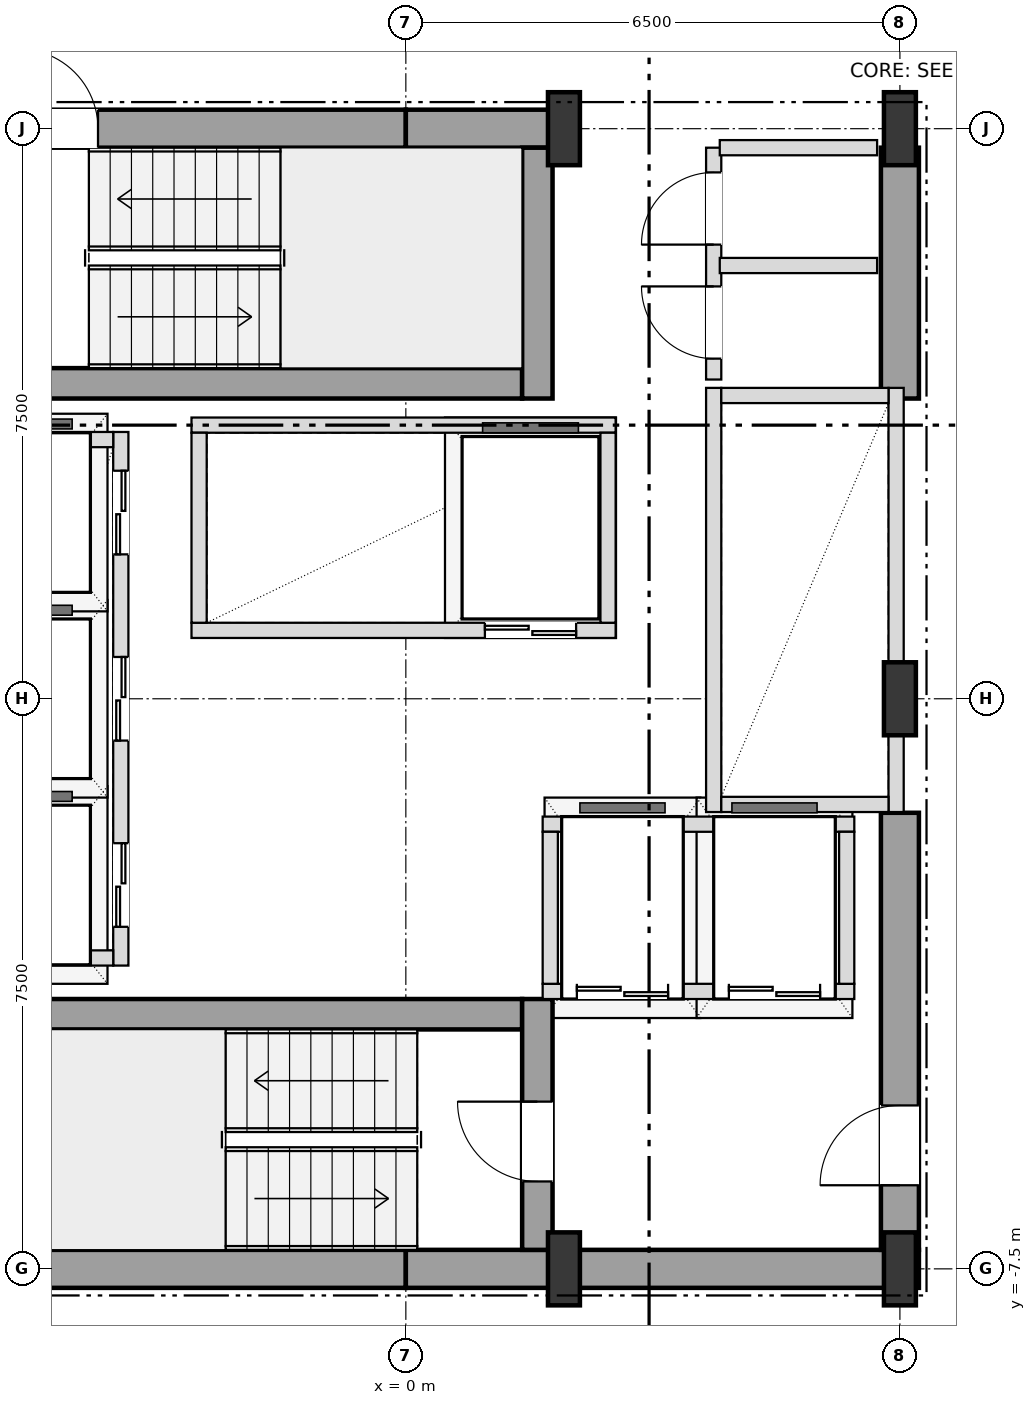
"""IFC4 building model, lengths in metres.
Left out: names, types, materials, properties, quantities, classifications, styles, units other than length and angle.
Written with IfcOpenShell. Run it as: python <this file> out.ifc"""

import sys

from ifc_helpers import new_model, si_unit, direction, frame, frame_2d, origin, origin_2d, place, context, subcontext, project, spatial, rectangle, i_section, extrude, element, fill, save


model = new_model("IFC4")
c1 = context("Model", 3, precision=1e-05, world=origin(), true_north=direction((0.0, 1.0)))
c2 = subcontext(c1, "Body", "Model", "MODEL_VIEW")
j1 = project(units=[si_unit("LENGTHUNIT", "METRE"), si_unit("PLANEANGLEUNIT", "RADIAN")], contexts=[c1])
p1 = place(None, origin())
s1 = spatial("IfcSite", under=j1, at=p1, CompositionType="ELEMENT")
p2 = place(p1, origin())
s2 = spatial("IfcBuilding", under=s1, at=p2, CompositionType="ELEMENT")
p3 = place(p2, frame((0.0, 0.0, 39.6)))
s3 = spatial("IfcBuildingStorey", under=s2, at=p3, CompositionType="ELEMENT", Elevation=39.6)
for number, where, z_axis, x_axis in (
    (1, (2.08, -7.5, 0.0), (0.0, 0.0, 1.0), (1.0, 0.0, 0.0)),
    (2, (6.5, -7.5, 0.0), (0.0, 0.0, 1.0), (1.0, 0.0, 0.0)),
    (3, (6.5, 0.0, 0.0), (0.0, 0.0, 1.0), (1.0, 0.0, 0.0)),
    (4, (2.08, 7.5, 0.0), (0.0, 0.0, 1.0), (1.0, 0.0, 0.0)),
    (5, (6.5, 7.5, 0.0), (0.0, 0.0, 1.0), (1.0, 0.0, 0.0)),
):
    element("IfcColumn", number, at=place(p3, frame(where, z_axis=z_axis, x_axis=x_axis)), inside=s3, PredefinedType="COLUMN", context=c2, shape_type="SweptSolid", body=[
        extrude(i_section(OverallWidth=0.42, OverallDepth=0.96, WebThickness=0.022, FlangeThickness=0.034, at=origin_2d()), origin(), (0.0, 0.0, 1.0), 3.6),
    ])
for number, where, z_axis, x_axis in (
    (6, (-6.75, -7.5, 0.0), (0.0, 0.0, 1.0), (1.0, 0.0, 0.0)),
    (7, (0.0, -7.5, 0.0), (0.0, 0.0, 1.0), (1.0, 0.0, 0.0)),
):
    element("IfcWall", number, at=place(p3, frame(where, z_axis=z_axis, x_axis=x_axis)), inside=s3, PredefinedType="SHEAR", context=c2, shape_type="SweptSolid", body=[
        extrude(rectangle(XDim=6.75, YDim=0.5, at=frame_2d((3.375, 0.0))), origin(), (0.0, 0.0, 1.0), 3.38),
    ])
p4 = place(p3, frame((-6.75, 7.5, 0.0), z_axis=(0.0, 0.0, 1.0), x_axis=(1.0, 0.0, 0.0)))
e8 = element("IfcWall", 8, at=p4, inside=s3, PredefinedType="SHEAR", context=c2, shape_type="SweptSolid", body=[
    extrude(rectangle(XDim=6.75, YDim=0.5, at=frame_2d((3.375, 0.0))), origin(), (0.0, 0.0, 1.0), 3.38),
])
p5 = place(p4, frame((1.65, 0.0, 0.0)))
e9 = element("IfcOpeningElement", 9, at=p5, cuts=e8, PredefinedType="OPENING", context=c2, shape_type="SweptSolid", body=[
    extrude(rectangle(XDim=1.05, YDim=2.15, at=frame_2d((0.525, 1.075))), frame((0.0, 0.26, 0.0), z_axis=(0.0, -1.0, 0.0), x_axis=(1.0, 0.0, 0.0)), (0.0, 0.0, 1.0), 0.52),
])
p6 = place(p3, frame((0.0, 7.5, 0.0), z_axis=(0.0, 0.0, 1.0), x_axis=(1.0, 0.0, 0.0)))
e10 = element("IfcWall", 10, at=p6, inside=s3, PredefinedType="SHEAR", context=c2, shape_type="SweptSolid", body=[
    extrude(rectangle(XDim=2.08, YDim=0.5, at=frame_2d((1.04, 0.0))), origin(), (0.0, 0.0, 1.0), 3.38),
])
p7 = place(p3, frame((6.5, -7.25, 0.0), z_axis=(0.0, 0.0, 1.0), x_axis=(0.0, 1.0, 0.0)))
e11 = element("IfcWall", 11, at=p7, inside=s3, PredefinedType="SHEAR", context=c2, shape_type="SweptSolid", body=[
    extrude(rectangle(XDim=5.75, YDim=0.5, at=frame_2d((2.875, 0.0))), origin(), (0.0, 0.0, 1.0), 3.38),
])
p8 = place(p7, frame((0.85, 0.0, 0.0)))
e12 = element("IfcOpeningElement", 12, at=p8, cuts=e11, PredefinedType="OPENING", context=c2, shape_type="SweptSolid", body=[
    extrude(rectangle(XDim=1.05, YDim=2.15, at=frame_2d((0.525, 1.075))), frame((0.0, 0.26, 0.0), z_axis=(0.0, -1.0, 0.0), x_axis=(1.0, 0.0, 0.0)), (0.0, 0.0, 1.0), 0.52),
])
p9 = place(p3, frame((6.5, 3.95, 0.0), z_axis=(0.0, 0.0, 1.0), x_axis=(0.0, 1.0, 0.0)))
e13 = element("IfcWall", 13, at=p9, inside=s3, PredefinedType="SHEAR", context=c2, shape_type="SweptSolid", body=[
    extrude(rectangle(XDim=3.3, YDim=0.5, at=frame_2d((1.65, 0.0))), origin(), (0.0, 0.0, 1.0), 3.38),
])
p10 = place(p3, frame((-6.25, -4.15, 0.0), z_axis=(0.0, 0.0, 1.0), x_axis=(1.0, 0.0, 0.0)))
e14 = element("IfcWall", 14, at=p10, inside=s3, PredefinedType="SHEAR", context=c2, shape_type="SweptSolid", body=[
    extrude(rectangle(XDim=7.78, YDim=0.4, at=frame_2d((3.89, 0.0))), origin(), (0.0, 0.0, 1.0), 3.38),
])
p11 = place(p3, frame((1.73, -7.25, 0.0), z_axis=(0.0, 0.0, 1.0), x_axis=(0.0, 1.0, 0.0)))
e15 = element("IfcWall", 15, at=p11, inside=s3, PredefinedType="SHEAR", context=c2, shape_type="SweptSolid", body=[
    extrude(rectangle(XDim=3.3, YDim=0.4, at=frame_2d((1.65, 0.0))), origin(), (0.0, 0.0, 1.0), 3.38),
])
p12 = place(p11, frame((0.9, 0.0, 0.0)))
e16 = element("IfcOpeningElement", 16, at=p12, cuts=e15, PredefinedType="OPENING", context=c2, shape_type="SweptSolid", body=[
    extrude(rectangle(XDim=1.05, YDim=2.15, at=frame_2d((0.525, 1.075))), frame((0.0, 0.21, 0.0), z_axis=(0.0, -1.0, 0.0), x_axis=(1.0, 0.0, 0.0)), (0.0, 0.0, 1.0), 0.42),
])
p13 = place(p3, frame((-5.55, 4.15, 0.0), z_axis=(0.0, 0.0, 1.0), x_axis=(1.0, 0.0, 0.0)))
e17 = element("IfcWall", 17, at=p13, inside=s3, PredefinedType="SHEAR", context=c2, shape_type="SweptSolid", body=[
    extrude(rectangle(XDim=7.08, YDim=0.4, at=frame_2d((3.54, 0.0))), origin(), (0.0, 0.0, 1.0), 3.38),
])
p14 = place(p3, frame((1.73, 3.95, 0.0), z_axis=(0.0, 0.0, 1.0), x_axis=(0.0, 1.0, 0.0)))
e18 = element("IfcWall", 18, at=p14, inside=s3, PredefinedType="SHEAR", context=c2, shape_type="SweptSolid", body=[
    extrude(rectangle(XDim=3.3, YDim=0.4, at=frame_2d((1.65, 0.0))), origin(), (0.0, 0.0, 1.0), 3.38),
])
p15 = place(p3, frame((-3.75, -3.51, 0.0), z_axis=(0.0, 0.0, 1.0), x_axis=(0.0, 1.0, 0.0)))
e19 = element("IfcWall", 19, at=p15, inside=s3, PredefinedType="SOLIDWALL", context=c2, shape_type="SweptSolid", body=[
    extrude(rectangle(XDim=7.02, YDim=0.2, at=frame_2d((3.51, 0.0))), origin(), (0.0, 0.0, 1.0), 3.38),
])
p16 = place(p15, frame((0.51, 0.0, 0.0)))
e20 = element("IfcOpeningElement", 20, at=p16, cuts=e19, PredefinedType="OPENING", context=c2, shape_type="SweptSolid", body=[
    extrude(rectangle(XDim=1.1, YDim=2.15, at=frame_2d((0.55, 1.075))), frame((0.0, 0.11, 0.0), z_axis=(0.0, -1.0, 0.0), x_axis=(1.0, 0.0, 0.0)), (0.0, 0.0, 1.0), 0.22),
])
p17 = place(p15, frame((2.96, 0.0, 0.0)))
e21 = element("IfcOpeningElement", 21, at=p17, cuts=e19, PredefinedType="OPENING", context=c2, shape_type="SweptSolid", body=[
    extrude(rectangle(XDim=1.1, YDim=2.15, at=frame_2d((0.55, 1.075))), frame((0.0, 0.11, 0.0), z_axis=(0.0, -1.0, 0.0), x_axis=(1.0, 0.0, 0.0)), (0.0, 0.0, 1.0), 0.22),
])
p18 = place(p15, frame((5.41, 0.0, 0.0)))
e22 = element("IfcOpeningElement", 22, at=p18, cuts=e19, PredefinedType="OPENING", context=c2, shape_type="SweptSolid", body=[
    extrude(rectangle(XDim=1.1, YDim=2.15, at=frame_2d((0.55, 1.075))), frame((0.0, 0.11, 0.0), z_axis=(0.0, -1.0, 0.0), x_axis=(1.0, 0.0, 0.0)), (0.0, 0.0, 1.0), 0.22),
])
for number, where, z_axis, x_axis in (
    (23, (-6.05, -3.41, 0.0), (0.0, 0.0, 1.0), (1.0, 0.0, 0.0)),
    (24, (-6.05, 3.41, 0.0), (0.0, 0.0, 1.0), (1.0, 0.0, 0.0)),
):
    element("IfcWall", number, at=place(p3, frame(where, z_axis=z_axis, x_axis=x_axis)), inside=s3, PredefinedType="SOLIDWALL", context=c2, shape_type="SweptSolid", body=[
        extrude(rectangle(XDim=2.2, YDim=0.2, at=frame_2d((1.1, 0.0))), origin(), (0.0, 0.0, 1.0), 3.38),
    ])
p19 = place(p3, frame((4.05, -1.49, 0.0), z_axis=(0.0, 0.0, 1.0), x_axis=(0.0, 1.0, 0.0)))
e25 = element("IfcWall", 25, at=p19, inside=s3, PredefinedType="SOLIDWALL", context=c2, shape_type="SweptSolid", body=[
    extrude(rectangle(XDim=5.58, YDim=0.2, at=frame_2d((2.79, 0.0))), origin(), (0.0, 0.0, 1.0), 3.38),
])
p20 = place(p3, frame((6.45, -1.49, 0.0), z_axis=(0.0, 0.0, 1.0), x_axis=(0.0, 1.0, 0.0)))
e26 = element("IfcWall", 26, at=p20, inside=s3, PredefinedType="SOLIDWALL", context=c2, shape_type="SweptSolid", body=[
    extrude(rectangle(XDim=5.58, YDim=0.2, at=frame_2d((2.79, 0.0))), origin(), (0.0, 0.0, 1.0), 2.816),
])
for number, where, z_axis, x_axis in (
    (27, (4.15, -1.39, 0.0), (0.0, 0.0, 1.0), (1.0, 0.0, 0.0)),
    (28, (4.15, 3.99, 0.0), (0.0, 0.0, 1.0), (1.0, 0.0, 0.0)),
):
    element("IfcWall", number, at=place(p3, frame(where, z_axis=z_axis, x_axis=x_axis)), inside=s3, PredefinedType="SOLIDWALL", context=c2, shape_type="SweptSolid", body=[
        extrude(rectangle(XDim=2.2, YDim=0.2, at=frame_2d((1.1, 0.0))), origin(), (0.0, 0.0, 1.0), 3.38),
    ])
p21 = place(p3, frame((-2.82, 0.9, 0.0), z_axis=(0.0, 0.0, 1.0), x_axis=(1.0, 0.0, 0.0)))
e29 = element("IfcWall", 29, at=p21, inside=s3, PredefinedType="SOLIDWALL", context=c2, shape_type="SweptSolid", body=[
    extrude(rectangle(XDim=5.58, YDim=0.2, at=frame_2d((2.79, 0.0))), origin(), (0.0, 0.0, 1.0), 3.38),
])
p22 = place(p21, frame((3.86, 0.0, 0.0)))
e30 = element("IfcOpeningElement", 30, at=p22, cuts=e29, PredefinedType="OPENING", context=c2, shape_type="SweptSolid", body=[
    extrude(rectangle(XDim=1.2, YDim=2.2, at=frame_2d((0.6, 1.1))), frame((0.0, 0.11, 0.0), z_axis=(0.0, -1.0, 0.0), x_axis=(1.0, 0.0, 0.0)), (0.0, 0.0, 1.0), 0.22),
])
p23 = place(p3, frame((-2.82, 3.6, 0.0), z_axis=(0.0, 0.0, 1.0), x_axis=(1.0, 0.0, 0.0)))
e31 = element("IfcWall", 31, at=p23, inside=s3, PredefinedType="SOLIDWALL", context=c2, shape_type="SweptSolid", body=[
    extrude(rectangle(XDim=5.58, YDim=0.2, at=frame_2d((2.79, 0.0))), origin(), (0.0, 0.0, 1.0), 3.38),
])
for number, where, z_axis, x_axis in (
    (32, (-2.72, 1.0, 0.0), (0.0, 0.0, 1.0), (0.0, 1.0, 0.0)),
    (33, (2.66, 1.0, 0.0), (0.0, 0.0, 1.0), (0.0, 1.0, 0.0)),
):
    element("IfcWall", number, at=place(p3, frame(where, z_axis=z_axis, x_axis=x_axis)), inside=s3, PredefinedType="SOLIDWALL", context=c2, shape_type="SweptSolid", body=[
        extrude(rectangle(XDim=2.5, YDim=0.2, at=frame_2d((1.25, 0.0))), origin(), (0.0, 0.0, 1.0), 3.38),
    ])
p24 = place(p3, frame((1.8, -3.85, 0.0), z_axis=(0.0, 0.0, 1.0), x_axis=(1.0, 0.0, 0.0)))
e34 = element("IfcWall", 34, at=p24, inside=s3, PredefinedType="SOLIDWALL", context=c2, shape_type="SweptSolid", body=[
    extrude(rectangle(XDim=4.1, YDim=0.2, at=frame_2d((2.05, 0.0))), origin(), (0.0, 0.0, 1.0), 3.38),
])
p25 = place(p24, frame((0.45, 0.0, 0.0)))
e35 = element("IfcOpeningElement", 35, at=p25, cuts=e34, PredefinedType="OPENING", context=c2, shape_type="SweptSolid", body=[
    extrude(rectangle(XDim=1.2, YDim=2.2, at=frame_2d((0.6, 1.1))), frame((0.0, 0.11, 0.0), z_axis=(0.0, -1.0, 0.0), x_axis=(1.0, 0.0, 0.0)), (0.0, 0.0, 1.0), 0.22),
])
p26 = place(p24, frame((2.45, 0.0, 0.0)))
e36 = element("IfcOpeningElement", 36, at=p26, cuts=e34, PredefinedType="OPENING", context=c2, shape_type="SweptSolid", body=[
    extrude(rectangle(XDim=1.2, YDim=2.2, at=frame_2d((0.6, 1.1))), frame((0.0, 0.11, 0.0), z_axis=(0.0, -1.0, 0.0), x_axis=(1.0, 0.0, 0.0)), (0.0, 0.0, 1.0), 0.22),
])
p27 = place(p3, frame((1.8, -1.65, 0.0), z_axis=(0.0, 0.0, 1.0), x_axis=(1.0, 0.0, 0.0)))
e37 = element("IfcWall", 37, at=p27, inside=s3, PredefinedType="SOLIDWALL", context=c2, shape_type="SweptSolid", body=[
    extrude(rectangle(XDim=4.1, YDim=0.2, at=frame_2d((2.05, 0.0))), origin(), (0.0, 0.0, 1.0), 3.38),
])
for number, where, z_axis, x_axis in (
    (38, (1.9, -3.75, 0.0), (0.0, 0.0, 1.0), (0.0, 1.0, 0.0)),
    (39, (5.8, -3.75, 0.0), (0.0, 0.0, 1.0), (0.0, 1.0, 0.0)),
):
    element("IfcWall", number, at=place(p3, frame(where, z_axis=z_axis, x_axis=x_axis)), inside=s3, PredefinedType="SOLIDWALL", context=c2, shape_type="SweptSolid", body=[
        extrude(rectangle(XDim=2.0, YDim=0.2, at=frame_2d((1.0, 0.0))), origin(), (0.0, 0.0, 1.0), 3.38),
    ])
p28 = place(p3, frame((4.05, 4.2, 0.0), z_axis=(0.0, 0.0, 1.0), x_axis=(0.0, 1.0, 0.0)))
e40 = element("IfcWall", 40, at=p28, inside=s3, PredefinedType="SOLIDWALL", context=c2, shape_type="SweptSolid", body=[
    extrude(rectangle(XDim=3.05, YDim=0.2, at=frame_2d((1.525, 0.0))), origin(), (0.0, 0.0, 1.0), 3.38),
])
p29 = place(p28, frame((0.275, 0.0, 0.0)))
e41 = element("IfcOpeningElement", 41, at=p29, cuts=e40, PredefinedType="OPENING", context=c2, shape_type="SweptSolid", body=[
    extrude(rectangle(XDim=0.95, YDim=2.15, at=frame_2d((0.475, 1.075))), frame((0.0, 0.11, 0.0), z_axis=(0.0, -1.0, 0.0), x_axis=(1.0, 0.0, 0.0)), (0.0, 0.0, 1.0), 0.22),
])
p30 = place(p28, frame((1.775, 0.0, 0.0)))
e42 = element("IfcOpeningElement", 42, at=p30, cuts=e40, PredefinedType="OPENING", context=c2, shape_type="SweptSolid", body=[
    extrude(rectangle(XDim=0.95, YDim=2.15, at=frame_2d((0.475, 1.075))), frame((0.0, 0.11, 0.0), z_axis=(0.0, -1.0, 0.0), x_axis=(1.0, 0.0, 0.0)), (0.0, 0.0, 1.0), 0.22),
])
for number, where, z_axis, x_axis in (
    (43, (4.13, 5.7, 0.0), (0.0, 0.0, 1.0), (1.0, 0.0, 0.0)),
    (44, (4.13, 7.25, 0.0), (0.0, 0.0, 1.0), (1.0, 0.0, 0.0)),
):
    element("IfcWall", number, at=place(p3, frame(where, z_axis=z_axis, x_axis=x_axis)), inside=s3, PredefinedType="SOLIDWALL", context=c2, shape_type="SweptSolid", body=[
        extrude(rectangle(XDim=2.07, YDim=0.2, at=frame_2d((1.035, 0.0))), origin(), (0.0, 0.0, 1.0), 3.38),
    ])
p31 = place(p8, origin())
e45 = element("IfcDoor", 45, at=p31, inside=s3, OperationType="SINGLE_SWING_LEFT", PredefinedType="DOOR", context=c2, shape_type="SweptSolid", body=[
    extrude(rectangle(XDim=1.05, YDim=2.15, at=frame_2d((0.525, 1.075))), frame((0.0, 0.025, 0.0), z_axis=(0.0, -1.0, 0.0), x_axis=(1.0, 0.0, 0.0)), (0.0, 0.0, 1.0), 0.05),
])
fill(e12, e45)
p32 = place(p12, origin())
e46 = element("IfcDoor", 46, at=p32, inside=s3, OperationType="SINGLE_SWING_RIGHT", PredefinedType="DOOR", context=c2, shape_type="SweptSolid", body=[
    extrude(rectangle(XDim=1.05, YDim=2.15, at=frame_2d((0.525, 1.075))), frame((0.0, 0.025, 0.0), z_axis=(0.0, -1.0, 0.0), x_axis=(1.0, 0.0, 0.0)), (0.0, 0.0, 1.0), 0.05),
])
fill(e16, e46)
p33 = place(p5, origin())
e47 = element("IfcDoor", 47, at=p33, inside=s3, OperationType="SINGLE_SWING_LEFT", PredefinedType="DOOR", context=c2, shape_type="SweptSolid", body=[
    extrude(rectangle(XDim=1.05, YDim=2.15, at=frame_2d((0.525, 1.075))), frame((0.0, 0.025, 0.0), z_axis=(0.0, -1.0, 0.0), x_axis=(1.0, 0.0, 0.0)), (0.0, 0.0, 1.0), 0.05),
])
fill(e9, e47)
p34 = place(p16, origin())
e48 = element("IfcDoor", 48, at=p34, inside=s3, OperationType="DOUBLE_DOOR_SLIDING", PredefinedType="DOOR", context=c2, shape_type="SweptSolid", body=[
    extrude(rectangle(XDim=1.1, YDim=2.15, at=frame_2d((0.55, 1.075))), frame((0.0, 0.025, 0.0), z_axis=(0.0, -1.0, 0.0), x_axis=(1.0, 0.0, 0.0)), (0.0, 0.0, 1.0), 0.05),
])
fill(e20, e48)
p35 = place(p17, origin())
e49 = element("IfcDoor", 49, at=p35, inside=s3, OperationType="DOUBLE_DOOR_SLIDING", PredefinedType="DOOR", context=c2, shape_type="SweptSolid", body=[
    extrude(rectangle(XDim=1.1, YDim=2.15, at=frame_2d((0.55, 1.075))), frame((0.0, 0.025, 0.0), z_axis=(0.0, -1.0, 0.0), x_axis=(1.0, 0.0, 0.0)), (0.0, 0.0, 1.0), 0.05),
])
fill(e21, e49)
p36 = place(p18, origin())
e50 = element("IfcDoor", 50, at=p36, inside=s3, OperationType="DOUBLE_DOOR_SLIDING", PredefinedType="DOOR", context=c2, shape_type="SweptSolid", body=[
    extrude(rectangle(XDim=1.1, YDim=2.15, at=frame_2d((0.55, 1.075))), frame((0.0, 0.025, 0.0), z_axis=(0.0, -1.0, 0.0), x_axis=(1.0, 0.0, 0.0)), (0.0, 0.0, 1.0), 0.05),
])
fill(e22, e50)
p37 = place(p22, origin())
e51 = element("IfcDoor", 51, at=p37, inside=s3, OperationType="DOUBLE_DOOR_SLIDING", PredefinedType="DOOR", context=c2, shape_type="SweptSolid", body=[
    extrude(rectangle(XDim=1.2, YDim=2.2, at=frame_2d((0.6, 1.1))), frame((0.0, 0.025, 0.0), z_axis=(0.0, -1.0, 0.0), x_axis=(1.0, 0.0, 0.0)), (0.0, 0.0, 1.0), 0.05),
])
fill(e30, e51)
p38 = place(p25, origin())
e52 = element("IfcDoor", 52, at=p38, inside=s3, OperationType="DOUBLE_DOOR_SLIDING", PredefinedType="DOOR", context=c2, shape_type="SweptSolid", body=[
    extrude(rectangle(XDim=1.2, YDim=2.2, at=frame_2d((0.6, 1.1))), frame((0.0, 0.025, 0.0), z_axis=(0.0, -1.0, 0.0), x_axis=(1.0, 0.0, 0.0)), (0.0, 0.0, 1.0), 0.05),
])
fill(e35, e52)
p39 = place(p26, origin())
e53 = element("IfcDoor", 53, at=p39, inside=s3, OperationType="DOUBLE_DOOR_SLIDING", PredefinedType="DOOR", context=c2, shape_type="SweptSolid", body=[
    extrude(rectangle(XDim=1.2, YDim=2.2, at=frame_2d((0.6, 1.1))), frame((0.0, 0.025, 0.0), z_axis=(0.0, -1.0, 0.0), x_axis=(1.0, 0.0, 0.0)), (0.0, 0.0, 1.0), 0.05),
])
fill(e36, e53)
p40 = place(p29, origin())
e54 = element("IfcDoor", 54, at=p40, inside=s3, OperationType="SINGLE_SWING_RIGHT", PredefinedType="DOOR", context=c2, shape_type="SweptSolid", body=[
    extrude(rectangle(XDim=0.95, YDim=2.15, at=frame_2d((0.475, 1.075))), frame((0.0, 0.025, 0.0), z_axis=(0.0, -1.0, 0.0), x_axis=(1.0, 0.0, 0.0)), (0.0, 0.0, 1.0), 0.05),
])
fill(e41, e54)
p41 = place(p30, origin())
e55 = element("IfcDoor", 55, at=p41, inside=s3, OperationType="SINGLE_SWING_LEFT", PredefinedType="DOOR", context=c2, shape_type="SweptSolid", body=[
    extrude(rectangle(XDim=0.95, YDim=2.15, at=frame_2d((0.475, 1.075))), frame((0.0, 0.025, 0.0), z_axis=(0.0, -1.0, 0.0), x_axis=(1.0, 0.0, 0.0)), (0.0, 0.0, 1.0), 0.05),
])
fill(e42, e55)
save(model, sys.argv[1])
